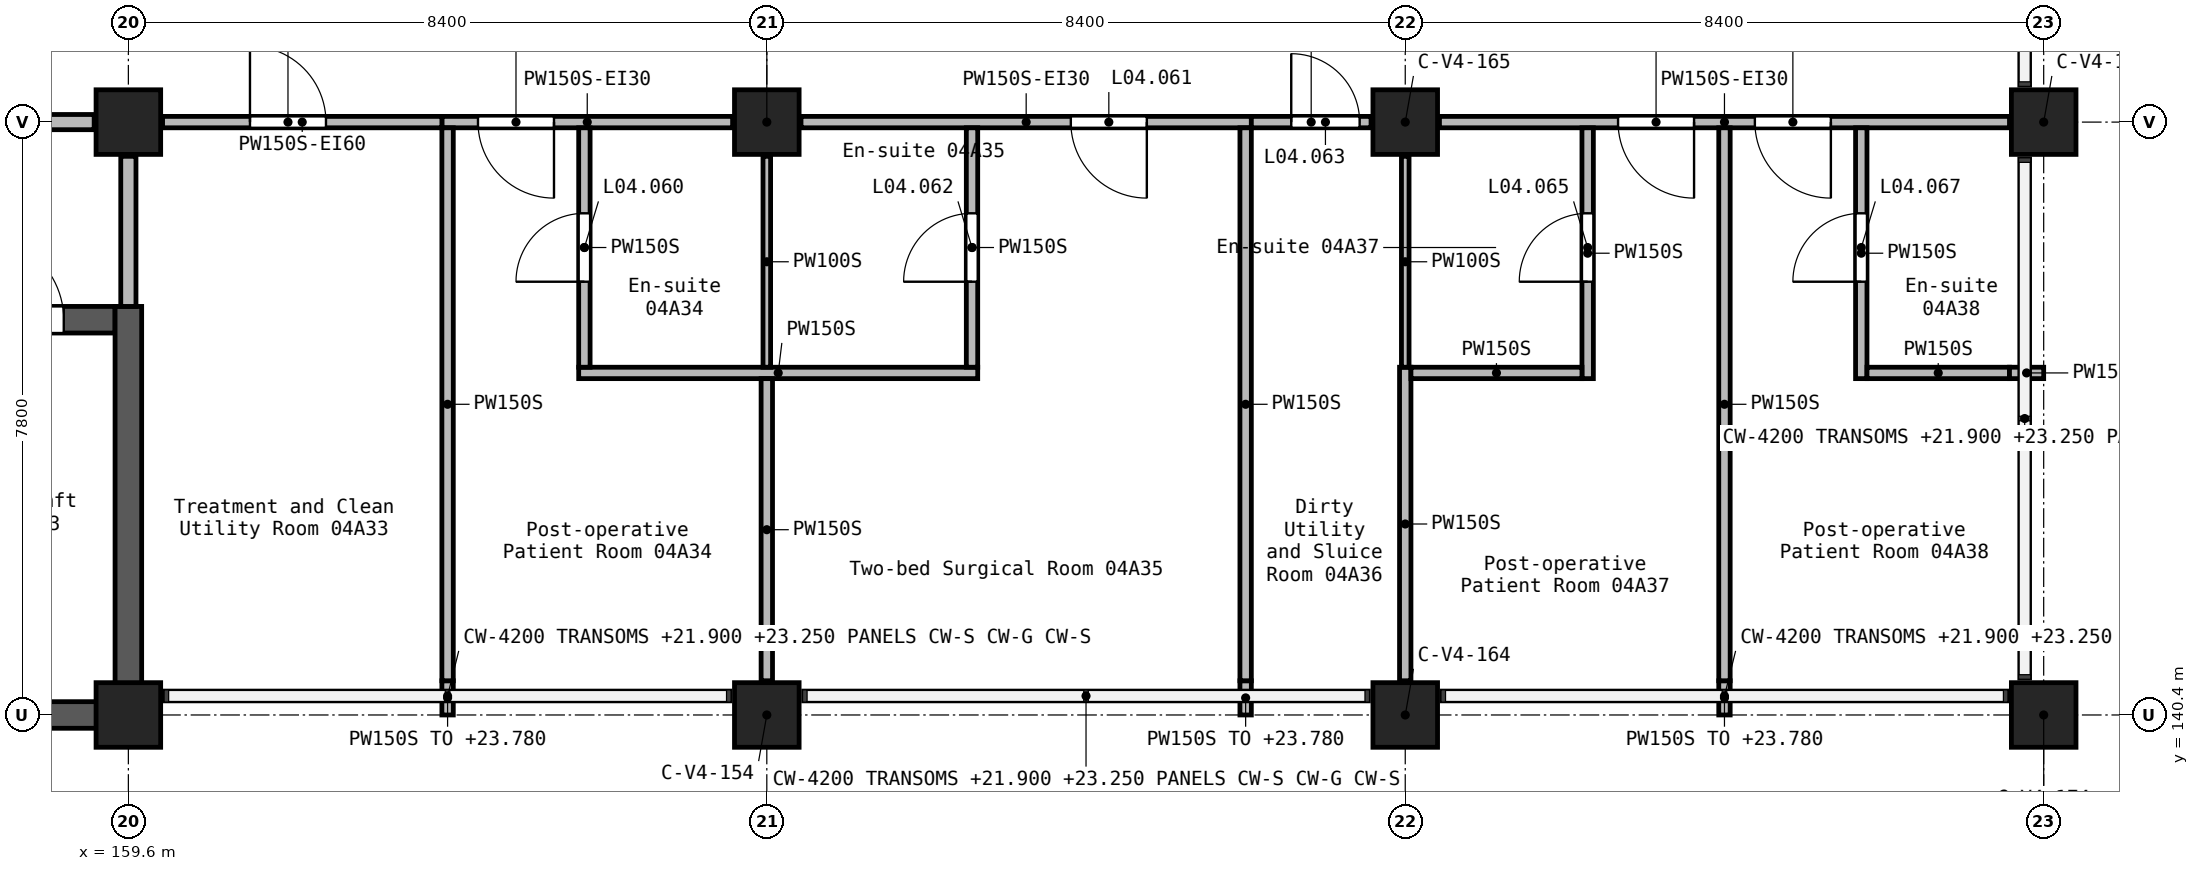
"""IFC4 building model, lengths in metres.
Left out: names, types, materials, properties, quantities, classifications, styles, units other than length and angle.
Written with IfcOpenShell. Run it as: python <this file> out.ifc"""

import sys

from ifc_helpers import new_model, si_unit, direction, frame, frame_2d, origin, origin_2d, place, context, subcontext, project, spatial, rectangle, extrude, element, fill, save


model = new_model("IFC4")
c1 = context("Model", 3, precision=1e-05, world=origin(), true_north=direction((0.0, 1.0)))
c2 = subcontext(c1, "Body", "Model", "MODEL_VIEW")
j1 = project(units=[si_unit("LENGTHUNIT", "METRE"), si_unit("PLANEANGLEUNIT", "RADIAN")], contexts=[c1])
p1 = place(None, origin())
s1 = spatial("IfcSite", under=j1, at=p1, CompositionType="ELEMENT")
p2 = place(p1, origin())
s2 = spatial("IfcBuilding", under=s1, at=p2, CompositionType="ELEMENT")
p3 = place(p2, frame((0.0, 0.0, 21.0)))
s3 = spatial("IfcBuildingStorey", under=s2, at=p3, CompositionType="ELEMENT", Elevation=21.0)
for number, where, z_axis, x_axis in (
    (1, (159.6, 140.4, 0.0), (0.0, 0.0, 1.0), (1.0, 0.0, 0.0)),
    (2, (159.6, 148.2, 0.0), (0.0, 0.0, 1.0), (1.0, 0.0, 0.0)),
    (3, (168.0, 140.4, 0.0), (0.0, 0.0, 1.0), (1.0, 0.0, 0.0)),
    (4, (168.0, 148.2, 0.0), (0.0, 0.0, 1.0), (1.0, 0.0, 0.0)),
    (5, (176.4, 140.4, 0.0), (0.0, 0.0, 1.0), (1.0, 0.0, 0.0)),
    (6, (176.4, 148.2, 0.0), (0.0, 0.0, 1.0), (1.0, 0.0, 0.0)),
    (7, (184.8, 140.4, 0.0), (0.0, 0.0, 1.0), (1.0, 0.0, 0.0)),
    (8, (184.8, 148.2, 0.0), (0.0, 0.0, 1.0), (1.0, 0.0, 0.0)),
):
    element("IfcColumn", number, at=place(p3, frame(where, z_axis=z_axis, x_axis=x_axis)), inside=s3, PredefinedType="COLUMN", context=c2, shape_type="SweptSolid", body=[
        extrude(rectangle(XDim=0.85, YDim=0.85, at=origin_2d()), origin(), (0.0, 0.0, 1.0), 3.9),
    ])
p4 = place(p3, frame((156.8, 140.4, 0.0), z_axis=(0.0, 0.0, 1.0), x_axis=(1.0, 0.0, 0.0)))
e9 = element("IfcWall", 9, at=p4, inside=s3, PredefinedType="SHEAR", context=c2, shape_type="SweptSolid", body=[
    extrude(rectangle(XDim=2.625, YDim=0.35, at=frame_2d((1.312, 0.0))), origin(), (0.0, 0.0, 1.0), 3.9),
])
p5 = place(p3, frame((156.8, 145.6, 0.0), z_axis=(0.0, 0.0, 1.0), x_axis=(1.0, 0.0, 0.0)))
e10 = element("IfcWall", 10, at=p5, inside=s3, PredefinedType="SHEAR", context=c2, shape_type="SweptSolid", body=[
    extrude(rectangle(XDim=2.625, YDim=0.35, at=frame_2d((1.312, 0.0))), origin(), (0.0, 0.0, 1.0), 3.9),
])
p6 = place(p5, frame((0.85, 0.0, 0.0)))
e11 = element("IfcOpeningElement", 11, at=p6, cuts=e10, PredefinedType="OPENING", context=c2, shape_type="SweptSolid", body=[
    extrude(rectangle(XDim=1.1, YDim=2.1, at=frame_2d((0.55, 1.05))), frame((0.0, 0.185, 0.0), z_axis=(0.0, -1.0, 0.0), x_axis=(1.0, 0.0, 0.0)), (0.0, 0.0, 1.0), 0.37),
])
p7 = place(p3, frame((159.6, 140.225, 0.0), z_axis=(0.0, 0.0, 1.0), x_axis=(0.0, 1.0, 0.0)))
e12 = element("IfcWall", 12, at=p7, inside=s3, PredefinedType="SHEAR", context=c2, shape_type="SweptSolid", body=[
    extrude(rectangle(XDim=5.55, YDim=0.35, at=frame_2d((2.775, 0.0))), origin(), (0.0, 0.0, 1.0), 3.9),
])
p8 = place(p3, frame((151.65, 148.2, 0.0), z_axis=(0.0, 0.0, 1.0), x_axis=(1.0, 0.0, 0.0)))
e13 = element("IfcWall", 13, at=p8, inside=s3, PredefinedType="SOLIDWALL", context=c2, shape_type="SweptSolid", body=[
    extrude(rectangle(XDim=7.5, YDim=0.2, at=frame_2d((3.75, 0.0))), origin(), (0.0, 0.0, 1.0), 3.6),
])
p9 = place(p8, frame((2.85, 0.0, 0.0)))
e14 = element("IfcOpeningElement", 14, at=p9, cuts=e13, PredefinedType="OPENING", context=c2, shape_type="SweptSolid", body=[
    extrude(rectangle(XDim=1.8, YDim=2.1, at=frame_2d((0.9, 1.05))), frame((0.0, 0.11, 0.0), z_axis=(0.0, -1.0, 0.0), x_axis=(1.0, 0.0, 0.0)), (0.0, 0.0, 1.0), 0.22),
])
p10 = place(p3, frame((159.6, 145.775, 0.0), z_axis=(0.0, 0.0, 1.0), x_axis=(0.0, 1.0, 0.0)))
e15 = element("IfcWall", 15, at=p10, inside=s3, PredefinedType="SOLIDWALL", context=c2, shape_type="SweptSolid", body=[
    extrude(rectangle(XDim=1.975, YDim=0.2, at=frame_2d((0.988, 0.0))), origin(), (0.0, 0.0, 1.0), 3.6),
])
p11 = place(p3, frame((174.375, 148.2, 0.0), z_axis=(0.0, 0.0, 1.0), x_axis=(-1.0, 0.0, 0.0)))
e16 = element("IfcWall", 16, at=p11, inside=s3, PredefinedType="PARTITIONING", context=c2, shape_type="SweptSolid", body=[
    extrude(rectangle(XDim=5.925, YDim=0.15, at=frame_2d((2.962, 0.0))), origin(), (0.0, 0.0, 1.0), 3.6),
])
p12 = place(p11, frame((1.375, 0.0, 0.0)))
e17 = element("IfcOpeningElement", 17, at=p12, cuts=e16, PredefinedType="OPENING", context=c2, shape_type="SweptSolid", body=[
    extrude(rectangle(XDim=1.0, YDim=2.1, at=frame_2d((0.5, 1.05))), frame((0.0, 0.085, 0.0), z_axis=(0.0, -1.0, 0.0), x_axis=(1.0, 0.0, 0.0)), (0.0, 0.0, 1.0), 0.17),
])
p13 = place(p3, frame((167.55, 148.2, 0.0), z_axis=(0.0, 0.0, 1.0), x_axis=(-1.0, 0.0, 0.0)))
e18 = element("IfcWall", 18, at=p13, inside=s3, PredefinedType="PARTITIONING", context=c2, shape_type="SweptSolid", body=[
    extrude(rectangle(XDim=3.825, YDim=0.15, at=frame_2d((1.913, 0.0))), origin(), (0.0, 0.0, 1.0), 3.6),
])
p14 = place(p13, frame((2.35, 0.0, 0.0)))
e19 = element("IfcOpeningElement", 19, at=p14, cuts=e18, PredefinedType="OPENING", context=c2, shape_type="SweptSolid", body=[
    extrude(rectangle(XDim=1.0, YDim=2.1, at=frame_2d((0.5, 1.05))), frame((0.0, 0.085, 0.0), z_axis=(0.0, -1.0, 0.0), x_axis=(1.0, 0.0, 0.0)), (0.0, 0.0, 1.0), 0.17),
])
p15 = place(p3, frame((184.35, 148.2, 0.0), z_axis=(0.0, 0.0, 1.0), x_axis=(-1.0, 0.0, 0.0)))
e20 = element("IfcWall", 20, at=p15, inside=s3, PredefinedType="PARTITIONING", context=c2, shape_type="SweptSolid", body=[
    extrude(rectangle(XDim=7.5, YDim=0.15, at=frame_2d((3.75, 0.0))), origin(), (0.0, 0.0, 1.0), 3.6),
])
p16 = place(p15, frame((4.15, 0.0, 0.0)))
e21 = element("IfcOpeningElement", 21, at=p16, cuts=e20, PredefinedType="OPENING", context=c2, shape_type="SweptSolid", body=[
    extrude(rectangle(XDim=1.0, YDim=2.1, at=frame_2d((0.5, 1.05))), frame((0.0, 0.085, 0.0), z_axis=(0.0, -1.0, 0.0), x_axis=(1.0, 0.0, 0.0)), (0.0, 0.0, 1.0), 0.17),
])
p17 = place(p15, frame((2.35, 0.0, 0.0)))
e22 = element("IfcOpeningElement", 22, at=p17, cuts=e20, PredefinedType="OPENING", context=c2, shape_type="SweptSolid", body=[
    extrude(rectangle(XDim=1.0, YDim=2.1, at=frame_2d((0.5, 1.05))), frame((0.0, 0.085, 0.0), z_axis=(0.0, -1.0, 0.0), x_axis=(1.0, 0.0, 0.0)), (0.0, 0.0, 1.0), 0.17),
])
p18 = place(p3, frame((160.05, 148.2, 0.0), z_axis=(0.0, 0.0, 1.0), x_axis=(1.0, 0.0, 0.0)))
e23 = element("IfcWall", 23, at=p18, inside=s3, PredefinedType="PARTITIONING", context=c2, shape_type="SweptSolid", body=[
    extrude(rectangle(XDim=3.675, YDim=0.15, at=frame_2d((1.837, 0.0))), origin(), (0.0, 0.0, 1.0), 3.6),
])
p19 = place(p18, frame((1.15, 0.0, 0.0)))
e24 = element("IfcOpeningElement", 24, at=p19, cuts=e23, PredefinedType="OPENING", context=c2, shape_type="SweptSolid", body=[
    extrude(rectangle(XDim=1.0, YDim=2.1, at=frame_2d((0.5, 1.05))), frame((0.0, 0.085, 0.0), z_axis=(0.0, -1.0, 0.0), x_axis=(1.0, 0.0, 0.0)), (0.0, 0.0, 1.0), 0.17),
])
p20 = place(p3, frame((174.375, 148.2, 0.0), z_axis=(0.0, 0.0, 1.0), x_axis=(1.0, 0.0, 0.0)))
e25 = element("IfcWall", 25, at=p20, inside=s3, PredefinedType="PARTITIONING", context=c2, shape_type="SweptSolid", body=[
    extrude(rectangle(XDim=1.575, YDim=0.15, at=frame_2d((0.788, 0.0))), origin(), (0.0, 0.0, 1.0), 3.6),
])
p21 = place(p20, frame((0.525, 0.0, 0.0)))
e26 = element("IfcOpeningElement", 26, at=p21, cuts=e25, PredefinedType="OPENING", context=c2, shape_type="SweptSolid", body=[
    extrude(rectangle(XDim=0.9, YDim=2.1, at=frame_2d((0.45, 1.05))), frame((0.0, 0.085, 0.0), z_axis=(0.0, -1.0, 0.0), x_axis=(1.0, 0.0, 0.0)), (0.0, 0.0, 1.0), 0.17),
])
p22 = place(p3, frame((163.8, 140.4, 0.0), z_axis=(0.0, 0.0, 1.0), x_axis=(0.0, 1.0, 0.0)))
e27 = element("IfcWall", 27, at=p22, inside=s3, PredefinedType="PARTITIONING", context=c2, shape_type="SweptSolid", body=[
    extrude(rectangle(XDim=0.45, YDim=0.15, at=frame_2d((0.225, 0.0))), origin(), (0.0, 0.0, 1.0), 2.78),
])
p23 = place(p3, frame((163.8, 140.85, 0.0), z_axis=(0.0, 0.0, 1.0), x_axis=(0.0, 1.0, 0.0)))
e28 = element("IfcWall", 28, at=p23, inside=s3, PredefinedType="PARTITIONING", context=c2, shape_type="SweptSolid", body=[
    extrude(rectangle(XDim=7.275, YDim=0.15, at=frame_2d((3.637, 0.0))), origin(), (0.0, 0.0, 1.0), 3.6),
])
p24 = place(p3, frame((174.3, 140.4, 0.0), z_axis=(0.0, 0.0, 1.0), x_axis=(0.0, 1.0, 0.0)))
e29 = element("IfcWall", 29, at=p24, inside=s3, PredefinedType="PARTITIONING", context=c2, shape_type="SweptSolid", body=[
    extrude(rectangle(XDim=0.45, YDim=0.15, at=frame_2d((0.225, 0.0))), origin(), (0.0, 0.0, 1.0), 2.78),
])
p25 = place(p3, frame((174.3, 140.85, 0.0), z_axis=(0.0, 0.0, 1.0), x_axis=(0.0, 1.0, 0.0)))
e30 = element("IfcWall", 30, at=p25, inside=s3, PredefinedType="PARTITIONING", context=c2, shape_type="SweptSolid", body=[
    extrude(rectangle(XDim=7.275, YDim=0.15, at=frame_2d((3.637, 0.0))), origin(), (0.0, 0.0, 1.0), 3.6),
])
p26 = place(p3, frame((180.6, 140.4, 0.0), z_axis=(0.0, 0.0, 1.0), x_axis=(0.0, 1.0, 0.0)))
e31 = element("IfcWall", 31, at=p26, inside=s3, PredefinedType="PARTITIONING", context=c2, shape_type="SweptSolid", body=[
    extrude(rectangle(XDim=0.45, YDim=0.15, at=frame_2d((0.225, 0.0))), origin(), (0.0, 0.0, 1.0), 2.78),
])
p27 = place(p3, frame((180.6, 140.85, 0.0), z_axis=(0.0, 0.0, 1.0), x_axis=(0.0, 1.0, 0.0)))
e32 = element("IfcWall", 32, at=p27, inside=s3, PredefinedType="PARTITIONING", context=c2, shape_type="SweptSolid", body=[
    extrude(rectangle(XDim=7.275, YDim=0.15, at=frame_2d((3.637, 0.0))), origin(), (0.0, 0.0, 1.0), 3.6),
])
p28 = place(p3, frame((165.525, 144.9, 0.0), z_axis=(0.0, 0.0, 1.0), x_axis=(1.0, 0.0, 0.0)))
e33 = element("IfcWall", 33, at=p28, inside=s3, PredefinedType="PARTITIONING", context=c2, shape_type="SweptSolid", body=[
    extrude(rectangle(XDim=5.25, YDim=0.15, at=frame_2d((2.625, 0.0))), origin(), (0.0, 0.0, 1.0), 3.6),
])
p29 = place(p3, frame((168.0, 140.85, 0.0), z_axis=(0.0, 0.0, 1.0), x_axis=(0.0, 1.0, 0.0)))
e34 = element("IfcWall", 34, at=p29, inside=s3, PredefinedType="PARTITIONING", context=c2, shape_type="SweptSolid", body=[
    extrude(rectangle(XDim=3.975, YDim=0.15, at=frame_2d((1.987, 0.0))), origin(), (0.0, 0.0, 1.0), 3.6),
])
p30 = place(p3, frame((176.4, 140.85, 0.0), z_axis=(0.0, 0.0, 1.0), x_axis=(0.0, 1.0, 0.0)))
e35 = element("IfcWall", 35, at=p30, inside=s3, PredefinedType="PARTITIONING", context=c2, shape_type="SweptSolid", body=[
    extrude(rectangle(XDim=4.125, YDim=0.15, at=frame_2d((2.062, 0.0))), origin(), (0.0, 0.0, 1.0), 3.6),
])
p31 = place(p3, frame((165.6, 144.975, 0.0), z_axis=(0.0, 0.0, 1.0), x_axis=(0.0, 1.0, 0.0)))
e36 = element("IfcWall", 36, at=p31, inside=s3, PredefinedType="PARTITIONING", context=c2, shape_type="SweptSolid", body=[
    extrude(rectangle(XDim=3.15, YDim=0.15, at=frame_2d((1.575, 0.0))), origin(), (0.0, 0.0, 1.0), 3.6),
])
p32 = place(p31, frame((1.125, 0.0, 0.0)))
e37 = element("IfcOpeningElement", 37, at=p32, cuts=e36, PredefinedType="OPENING", context=c2, shape_type="SweptSolid", body=[
    extrude(rectangle(XDim=0.9, YDim=2.1, at=frame_2d((0.45, 1.05))), frame((0.0, 0.085, 0.0), z_axis=(0.0, -1.0, 0.0), x_axis=(1.0, 0.0, 0.0)), (0.0, 0.0, 1.0), 0.17),
])
p33 = place(p3, frame((170.7, 144.975, 0.0), z_axis=(0.0, 0.0, 1.0), x_axis=(0.0, 1.0, 0.0)))
e38 = element("IfcWall", 38, at=p33, inside=s3, PredefinedType="PARTITIONING", context=c2, shape_type="SweptSolid", body=[
    extrude(rectangle(XDim=3.15, YDim=0.15, at=frame_2d((1.575, 0.0))), origin(), (0.0, 0.0, 1.0), 3.6),
])
p34 = place(p33, frame((1.125, 0.0, 0.0)))
e39 = element("IfcOpeningElement", 39, at=p34, cuts=e38, PredefinedType="OPENING", context=c2, shape_type="SweptSolid", body=[
    extrude(rectangle(XDim=0.9, YDim=2.1, at=frame_2d((0.45, 1.05))), frame((0.0, 0.085, 0.0), z_axis=(0.0, -1.0, 0.0), x_axis=(1.0, 0.0, 0.0)), (0.0, 0.0, 1.0), 0.17),
])
p35 = place(p3, frame((178.8, 144.825, 0.0), z_axis=(0.0, 0.0, 1.0), x_axis=(0.0, 1.0, 0.0)))
e40 = element("IfcWall", 40, at=p35, inside=s3, PredefinedType="PARTITIONING", context=c2, shape_type="SweptSolid", body=[
    extrude(rectangle(XDim=3.3, YDim=0.15, at=frame_2d((1.65, 0.0))), origin(), (0.0, 0.0, 1.0), 3.6),
])
p36 = place(p35, frame((1.275, 0.0, 0.0)))
e41 = element("IfcOpeningElement", 41, at=p36, cuts=e40, PredefinedType="OPENING", context=c2, shape_type="SweptSolid", body=[
    extrude(rectangle(XDim=0.9, YDim=2.1, at=frame_2d((0.45, 1.05))), frame((0.0, 0.085, 0.0), z_axis=(0.0, -1.0, 0.0), x_axis=(1.0, 0.0, 0.0)), (0.0, 0.0, 1.0), 0.17),
])
p37 = place(p3, frame((182.4, 144.825, 0.0), z_axis=(0.0, 0.0, 1.0), x_axis=(0.0, 1.0, 0.0)))
e42 = element("IfcWall", 42, at=p37, inside=s3, PredefinedType="PARTITIONING", context=c2, shape_type="SweptSolid", body=[
    extrude(rectangle(XDim=3.3, YDim=0.15, at=frame_2d((1.65, 0.0))), origin(), (0.0, 0.0, 1.0), 3.6),
])
p38 = place(p37, frame((1.275, 0.0, 0.0)))
e43 = element("IfcOpeningElement", 43, at=p38, cuts=e42, PredefinedType="OPENING", context=c2, shape_type="SweptSolid", body=[
    extrude(rectangle(XDim=0.9, YDim=2.1, at=frame_2d((0.45, 1.05))), frame((0.0, 0.085, 0.0), z_axis=(0.0, -1.0, 0.0), x_axis=(1.0, 0.0, 0.0)), (0.0, 0.0, 1.0), 0.17),
])
p39 = place(p3, frame((176.475, 144.9, 0.0), z_axis=(0.0, 0.0, 1.0), x_axis=(1.0, 0.0, 0.0)))
e44 = element("IfcWall", 44, at=p39, inside=s3, PredefinedType="PARTITIONING", context=c2, shape_type="SweptSolid", body=[
    extrude(rectangle(XDim=2.25, YDim=0.15, at=frame_2d((1.125, 0.0))), origin(), (0.0, 0.0, 1.0), 3.6),
])
p40 = place(p3, frame((182.475, 144.9, 0.0), z_axis=(0.0, 0.0, 1.0), x_axis=(1.0, 0.0, 0.0)))
e45 = element("IfcWall", 45, at=p40, inside=s3, PredefinedType="PARTITIONING", context=c2, shape_type="SweptSolid", body=[
    extrude(rectangle(XDim=1.875, YDim=0.15, at=frame_2d((0.938, 0.0))), origin(), (0.0, 0.0, 1.0), 3.6),
])
p41 = place(p3, frame((184.35, 144.9, 0.0), z_axis=(0.0, 0.0, 1.0), x_axis=(1.0, 0.0, 0.0)))
e46 = element("IfcWall", 46, at=p41, inside=s3, PredefinedType="PARTITIONING", context=c2, shape_type="SweptSolid", body=[
    extrude(rectangle(XDim=0.45, YDim=0.15, at=frame_2d((0.225, 0.0))), origin(), (0.0, 0.0, 1.0), 2.78),
])
for number, where, z_axis, x_axis in (
    (47, (168.0, 144.975, 0.0), (0.0, 0.0, 1.0), (0.0, 1.0, 0.0)),
    (48, (176.4, 144.975, 0.0), (0.0, 0.0, 1.0), (0.0, 1.0, 0.0)),
):
    element("IfcWall", number, at=place(p3, frame(where, z_axis=z_axis, x_axis=x_axis)), inside=s3, PredefinedType="PARTITIONING", context=c2, shape_type="SweptSolid", body=[
        extrude(rectangle(XDim=2.775, YDim=0.1, at=frame_2d((1.387, 0.0))), origin(), (0.0, 0.0, 1.0), 3.6),
    ])
p42 = place(p19, frame((1.0, 0.0, 0.0), z_axis=(0.0, 0.0, 1.0), x_axis=(-1.0, 0.0, 0.0)))
e49 = element("IfcDoor", 49, at=p42, inside=s3, OperationType="SINGLE_SWING_RIGHT", PredefinedType="DOOR", context=c2, shape_type="SweptSolid", body=[
    extrude(rectangle(XDim=1.0, YDim=2.1, at=frame_2d((0.5, 1.05))), frame((0.0, 0.025, 0.0), z_axis=(0.0, -1.0, 0.0), x_axis=(1.0, 0.0, 0.0)), (0.0, 0.0, 1.0), 0.05),
])
fill(e24, e49)
p43 = place(p14, origin())
e50 = element("IfcDoor", 50, at=p43, inside=s3, OperationType="SINGLE_SWING_RIGHT", PredefinedType="DOOR", context=c2, shape_type="SweptSolid", body=[
    extrude(rectangle(XDim=1.0, YDim=2.1, at=frame_2d((0.5, 1.05))), frame((0.0, 0.025, 0.0), z_axis=(0.0, -1.0, 0.0), x_axis=(1.0, 0.0, 0.0)), (0.0, 0.0, 1.0), 0.05),
])
fill(e19, e50)
p44 = place(p32, frame((0.9, 0.0, 0.0), z_axis=(0.0, 0.0, 1.0), x_axis=(-1.0, 0.0, 0.0)))
e51 = element("IfcDoor", 51, at=p44, inside=s3, OperationType="SINGLE_SWING_LEFT", PredefinedType="DOOR", context=c2, shape_type="SweptSolid", body=[
    extrude(rectangle(XDim=0.9, YDim=2.1, at=frame_2d((0.45, 1.05))), frame((0.0, 0.025, 0.0), z_axis=(0.0, -1.0, 0.0), x_axis=(1.0, 0.0, 0.0)), (0.0, 0.0, 1.0), 0.05),
])
fill(e37, e51)
p45 = place(p12, origin())
e52 = element("IfcDoor", 52, at=p45, inside=s3, OperationType="SINGLE_SWING_LEFT", PredefinedType="DOOR", context=c2, shape_type="SweptSolid", body=[
    extrude(rectangle(XDim=1.0, YDim=2.1, at=frame_2d((0.5, 1.05))), frame((0.0, 0.025, 0.0), z_axis=(0.0, -1.0, 0.0), x_axis=(1.0, 0.0, 0.0)), (0.0, 0.0, 1.0), 0.05),
])
fill(e17, e52)
p46 = place(p34, origin())
e53 = element("IfcDoor", 53, at=p46, inside=s3, OperationType="SINGLE_SWING_RIGHT", PredefinedType="DOOR", context=c2, shape_type="SweptSolid", body=[
    extrude(rectangle(XDim=0.9, YDim=2.1, at=frame_2d((0.45, 1.05))), frame((0.0, 0.025, 0.0), z_axis=(0.0, -1.0, 0.0), x_axis=(1.0, 0.0, 0.0)), (0.0, 0.0, 1.0), 0.05),
])
fill(e39, e53)
p47 = place(p21, frame((0.9, 0.0, 0.0), z_axis=(0.0, 0.0, 1.0), x_axis=(-1.0, 0.0, 0.0)))
e54 = element("IfcDoor", 54, at=p47, inside=s3, OperationType="SINGLE_SWING_LEFT", PredefinedType="DOOR", context=c2, shape_type="SweptSolid", body=[
    extrude(rectangle(XDim=0.9, YDim=2.1, at=frame_2d((0.45, 1.05))), frame((0.0, 0.025, 0.0), z_axis=(0.0, -1.0, 0.0), x_axis=(1.0, 0.0, 0.0)), (0.0, 0.0, 1.0), 0.05),
])
fill(e26, e54)
p48 = place(p16, origin())
e55 = element("IfcDoor", 55, at=p48, inside=s3, OperationType="SINGLE_SWING_RIGHT", PredefinedType="DOOR", context=c2, shape_type="SweptSolid", body=[
    extrude(rectangle(XDim=1.0, YDim=2.1, at=frame_2d((0.5, 1.05))), frame((0.0, 0.025, 0.0), z_axis=(0.0, -1.0, 0.0), x_axis=(1.0, 0.0, 0.0)), (0.0, 0.0, 1.0), 0.05),
])
fill(e21, e55)
p49 = place(p36, origin())
e56 = element("IfcDoor", 56, at=p49, inside=s3, OperationType="SINGLE_SWING_RIGHT", PredefinedType="DOOR", context=c2, shape_type="SweptSolid", body=[
    extrude(rectangle(XDim=0.9, YDim=2.1, at=frame_2d((0.45, 1.05))), frame((0.0, 0.025, 0.0), z_axis=(0.0, -1.0, 0.0), x_axis=(1.0, 0.0, 0.0)), (0.0, 0.0, 1.0), 0.05),
])
fill(e41, e56)
p50 = place(p17, origin())
e57 = element("IfcDoor", 57, at=p50, inside=s3, OperationType="SINGLE_SWING_LEFT", PredefinedType="DOOR", context=c2, shape_type="SweptSolid", body=[
    extrude(rectangle(XDim=1.0, YDim=2.1, at=frame_2d((0.5, 1.05))), frame((0.0, 0.025, 0.0), z_axis=(0.0, -1.0, 0.0), x_axis=(1.0, 0.0, 0.0)), (0.0, 0.0, 1.0), 0.05),
])
fill(e22, e57)
p51 = place(p38, frame((0.9, 0.0, 0.0), z_axis=(0.0, 0.0, 1.0), x_axis=(-1.0, 0.0, 0.0)))
e58 = element("IfcDoor", 58, at=p51, inside=s3, OperationType="SINGLE_SWING_LEFT", PredefinedType="DOOR", context=c2, shape_type="SweptSolid", body=[
    extrude(rectangle(XDim=0.9, YDim=2.1, at=frame_2d((0.45, 1.05))), frame((0.0, 0.025, 0.0), z_axis=(0.0, -1.0, 0.0), x_axis=(1.0, 0.0, 0.0)), (0.0, 0.0, 1.0), 0.05),
])
fill(e43, e58)
p52 = place(p6, origin())
e59 = element("IfcDoor", 59, at=p52, inside=s3, OperationType="DOUBLE_DOOR_SLIDING", PredefinedType="DOOR", context=c2, shape_type="SweptSolid", body=[
    extrude(rectangle(XDim=1.1, YDim=2.1, at=frame_2d((0.55, 1.05))), frame((0.0, 0.025, 0.0), z_axis=(0.0, -1.0, 0.0), x_axis=(1.0, 0.0, 0.0)), (0.0, 0.0, 1.0), 0.05),
])
fill(e11, e59)
save(model, sys.argv[1])
